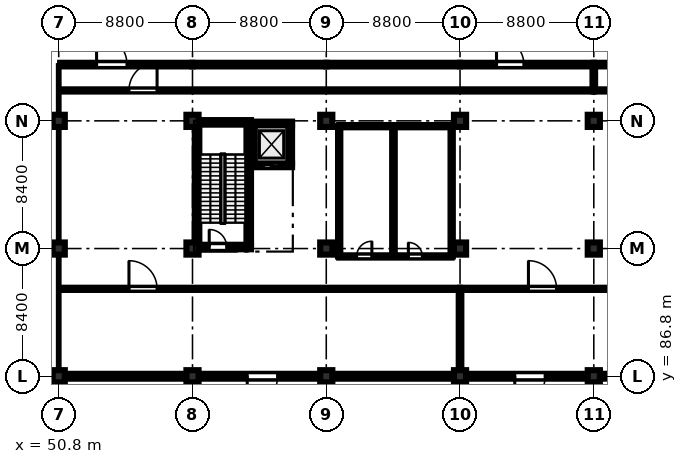
"""IFC4 building model, lengths in metres.
Left out: names, types, materials, properties, quantities, classifications, styles, units other than length and angle.
Written with IfcOpenShell. Run it as: python <this file> out.ifc"""

import sys

from ifc_helpers import new_model, si_unit, direction, frame, frame_2d, origin, origin_2d, place, context, subcontext, project, spatial, rectangle, extrude, element, fill, save


model = new_model("IFC4")
c1 = context("Model", 3, precision=1e-05, world=origin(), true_north=direction((0.0, 1.0)))
c2 = subcontext(c1, "Body", "Model", "MODEL_VIEW")
j1 = project(units=[si_unit("LENGTHUNIT", "METRE"), si_unit("PLANEANGLEUNIT", "RADIAN")], contexts=[c1])
p1 = place(None, origin())
s1 = spatial("IfcSite", under=j1, at=p1, CompositionType="ELEMENT")
p2 = place(p1, origin())
s2 = spatial("IfcBuilding", under=s1, at=p2, CompositionType="ELEMENT")
p3 = place(p2, origin())
s3 = spatial("IfcBuildingStorey", under=s2, at=p3, CompositionType="ELEMENT", Elevation=0.0)
for number, where, z_axis, x_axis in (
    (1, (50.8, 86.8, 0.0), (0.0, 0.0, 1.0), (1.0, 0.0, 0.0)),
    (2, (50.8, 95.2, 0.0), (0.0, 0.0, 1.0), (1.0, 0.0, 0.0)),
    (3, (50.8, 103.6, 0.0), (0.0, 0.0, 1.0), (1.0, 0.0, 0.0)),
    (4, (59.6, 86.8, 0.0), (0.0, 0.0, 1.0), (1.0, 0.0, 0.0)),
    (5, (59.6, 95.2, 0.0), (0.0, 0.0, 1.0), (1.0, 0.0, 0.0)),
    (6, (59.6, 103.6, 0.0), (0.0, 0.0, 1.0), (1.0, 0.0, 0.0)),
    (7, (68.4, 86.8, 0.0), (0.0, 0.0, 1.0), (1.0, 0.0, 0.0)),
    (8, (68.4, 95.2, 0.0), (0.0, 0.0, 1.0), (1.0, 0.0, 0.0)),
    (9, (68.4, 103.6, 0.0), (0.0, 0.0, 1.0), (1.0, 0.0, 0.0)),
    (10, (77.2, 86.8, 0.0), (0.0, 0.0, 1.0), (1.0, 0.0, 0.0)),
    (11, (77.2, 95.2, 0.0), (0.0, 0.0, 1.0), (1.0, 0.0, 0.0)),
    (12, (77.2, 103.6, 0.0), (0.0, 0.0, 1.0), (1.0, 0.0, 0.0)),
    (13, (86.0, 86.8, 0.0), (0.0, 0.0, 1.0), (1.0, 0.0, 0.0)),
    (14, (86.0, 95.2, 0.0), (0.0, 0.0, 1.0), (1.0, 0.0, 0.0)),
    (15, (86.0, 103.6, 0.0), (0.0, 0.0, 1.0), (1.0, 0.0, 0.0)),
):
    element("IfcColumn", number, at=place(p3, frame(where, z_axis=z_axis, x_axis=x_axis)), inside=s3, PredefinedType="COLUMN", context=c2, shape_type="SweptSolid", body=[
        extrude(rectangle(XDim=0.8, YDim=0.8, at=origin_2d()), origin(), (0.0, 0.0, 1.0), 5.18),
    ])
p4 = place(p3, frame((59.75, 95.3, 0.0), z_axis=(0.0, 0.0, 1.0), x_axis=(1.0, 0.0, 0.0)))
e16 = element("IfcWall", 16, at=p4, inside=s3, PredefinedType="SHEAR", context=c2, shape_type="SweptSolid", body=[
    extrude(rectangle(XDim=3.7, YDim=0.3, at=frame_2d((1.85, 0.0))), origin(), (0.0, 0.0, 1.0), 5.18),
])
p5 = place(p4, frame((0.95, 0.0, 0.0)))
e17 = element("IfcOpeningElement", 17, at=p5, cuts=e16, PredefinedType="OPENING", context=c2, shape_type="SweptSolid", body=[
    extrude(rectangle(XDim=1.15, YDim=2.15, at=frame_2d((0.575, 1.075))), frame((0.0, 0.16, 0.0), z_axis=(0.0, -1.0, 0.0), x_axis=(1.0, 0.0, 0.0)), (0.0, 0.0, 1.0), 0.32),
])
p6 = place(p3, frame((59.75, 103.5, 0.0), z_axis=(0.0, 0.0, 1.0), x_axis=(1.0, 0.0, 0.0)))
e18 = element("IfcWall", 18, at=p6, inside=s3, PredefinedType="SHEAR", context=c2, shape_type="SweptSolid", body=[
    extrude(rectangle(XDim=3.7, YDim=0.3, at=frame_2d((1.85, 0.0))), origin(), (0.0, 0.0, 1.0), 5.18),
])
for number, where, z_axis, x_axis in (
    (19, (59.9, 95.45, 0.0), (0.0, 0.0, 1.0), (0.0, 1.0, 0.0)),
    (20, (63.3, 95.45, 0.0), (0.0, 0.0, 1.0), (0.0, 1.0, 0.0)),
):
    element("IfcWall", number, at=place(p3, frame(where, z_axis=z_axis, x_axis=x_axis)), inside=s3, PredefinedType="SHEAR", context=c2, shape_type="SweptSolid", body=[
        extrude(rectangle(XDim=7.9, YDim=0.3, at=frame_2d((3.95, 0.0))), origin(), (0.0, 0.0, 1.0), 5.18),
    ])
p7 = place(p3, frame((63.45, 100.675, 0.0), z_axis=(0.0, 0.0, 1.0), x_axis=(1.0, 0.0, 0.0)))
e21 = element("IfcWall", 21, at=p7, inside=s3, PredefinedType="SHEAR", context=c2, shape_type="SweptSolid", body=[
    extrude(rectangle(XDim=2.7, YDim=0.25, at=frame_2d((1.35, 0.0))), origin(), (0.0, 0.0, 1.0), 5.18),
])
p8 = place(p7, frame((0.83, 0.0, 0.0)))
e22 = element("IfcOpeningElement", 22, at=p8, cuts=e21, PredefinedType="OPENING", context=c2, shape_type="SweptSolid", body=[
    extrude(rectangle(XDim=1.04, YDim=2.15, at=frame_2d((0.52, 1.075))), frame((0.0, 0.135, 0.0), z_axis=(0.0, -1.0, 0.0), x_axis=(1.0, 0.0, 0.0)), (0.0, 0.0, 1.0), 0.27),
])
p9 = place(p3, frame((63.45, 103.425, 0.0), z_axis=(0.0, 0.0, 1.0), x_axis=(1.0, 0.0, 0.0)))
e23 = element("IfcWall", 23, at=p9, inside=s3, PredefinedType="SHEAR", context=c2, shape_type="SweptSolid", body=[
    extrude(rectangle(XDim=2.7, YDim=0.25, at=frame_2d((1.35, 0.0))), origin(), (0.0, 0.0, 1.0), 5.18),
])
for number, where, z_axis, x_axis in (
    (24, (63.575, 100.8, 0.0), (0.0, 0.0, 1.0), (0.0, 1.0, 0.0)),
    (25, (66.025, 100.8, 0.0), (0.0, 0.0, 1.0), (0.0, 1.0, 0.0)),
):
    element("IfcWall", number, at=place(p3, frame(where, z_axis=z_axis, x_axis=x_axis)), inside=s3, PredefinedType="SHEAR", context=c2, shape_type="SweptSolid", body=[
        extrude(rectangle(XDim=2.5, YDim=0.25, at=frame_2d((1.25, 0.0))), origin(), (0.0, 0.0, 1.0), 5.18),
    ])
p10 = place(p3, frame((50.89, 107.3, 0.0), z_axis=(0.0, 0.0, 1.0), x_axis=(1.0, 0.0, 0.0)))
e26 = element("IfcWall", 26, at=p10, inside=s3, PredefinedType="STANDARD", context=c2, shape_type="SweptSolid", body=[
    extrude(rectangle(XDim=8.71, YDim=0.24, at=frame_2d((4.355, 0.0))), origin(), (0.0, 0.0, 1.0), 5.18),
])
p11 = place(p10, frame((2.4, 0.0, 0.0)))
e27 = element("IfcOpeningElement", 27, at=p11, cuts=e26, PredefinedType="OPENING", context=c2, shape_type="SweptSolid", body=[
    extrude(rectangle(XDim=2.0, YDim=2.4, at=frame_2d((1.0, 1.2))), frame((0.0, 0.13, 0.0), z_axis=(0.0, -1.0, 0.0), x_axis=(1.0, 0.0, 0.0)), (0.0, 0.0, 1.0), 0.26),
])
p12 = place(p3, frame((59.2, 86.8, 0.0), z_axis=(0.0, 0.0, 1.0), x_axis=(-1.0, 0.0, 0.0)))
e28 = element("IfcWall", 28, at=p12, inside=s3, PredefinedType="STANDARD", context=c2, shape_type="SweptSolid", body=[
    extrude(rectangle(XDim=8.0, YDim=0.32, at=frame_2d((4.0, 0.0))), origin(), (0.0, 0.0, 1.0), 4.53),
])
p13 = place(p12, frame((2.8, 0.0, 0.95)))
e29 = element("IfcOpeningElement", 29, at=p13, cuts=e28, PredefinedType="OPENING", context=c2, shape_type="SweptSolid", body=[
    extrude(rectangle(XDim=2.0, YDim=2.2, at=frame_2d((1.0, 1.1))), frame((0.0, 0.17, 0.0), z_axis=(0.0, -1.0, 0.0), x_axis=(1.0, 0.0, 0.0)), (0.0, 0.0, 1.0), 0.34),
])
p14 = place(p3, frame((59.6, 107.3, 0.0), z_axis=(0.0, 0.0, 1.0), x_axis=(1.0, 0.0, 0.0)))
e30 = element("IfcWall", 30, at=p14, inside=s3, PredefinedType="STANDARD", context=c2, shape_type="SweptSolid", body=[
    extrude(rectangle(XDim=8.8, YDim=0.24, at=frame_2d((4.4, 0.0))), origin(), (0.0, 0.0, 1.0), 5.18),
])
p15 = place(p14, frame((2.4, 0.0, 0.8)))
e31 = element("IfcOpeningElement", 31, at=p15, cuts=e30, PredefinedType="OPENING", context=c2, shape_type="SweptSolid", body=[
    extrude(rectangle(XDim=3.0, YDim=2.4, at=frame_2d((1.5, 1.2))), frame((0.0, 0.13, 0.0), z_axis=(0.0, -1.0, 0.0), x_axis=(1.0, 0.0, 0.0)), (0.0, 0.0, 1.0), 0.26),
])
p16 = place(p3, frame((68.0, 86.8, 0.0), z_axis=(0.0, 0.0, 1.0), x_axis=(-1.0, 0.0, 0.0)))
e32 = element("IfcWall", 32, at=p16, inside=s3, PredefinedType="STANDARD", context=c2, shape_type="SweptSolid", body=[
    extrude(rectangle(XDim=8.0, YDim=0.32, at=frame_2d((4.0, 0.0))), origin(), (0.0, 0.0, 1.0), 4.53),
])
p17 = place(p16, frame((2.8, 0.0, 0.0)))
e33 = element("IfcOpeningElement", 33, at=p17, cuts=e32, PredefinedType="OPENING", context=c2, shape_type="SweptSolid", body=[
    extrude(rectangle(XDim=2.0, YDim=2.4, at=frame_2d((1.0, 1.2))), frame((0.0, 0.17, 0.0), z_axis=(0.0, -1.0, 0.0), x_axis=(1.0, 0.0, 0.0)), (0.0, 0.0, 1.0), 0.34),
])
p18 = place(p3, frame((68.4, 107.3, 0.0), z_axis=(0.0, 0.0, 1.0), x_axis=(1.0, 0.0, 0.0)))
e34 = element("IfcWall", 34, at=p18, inside=s3, PredefinedType="STANDARD", context=c2, shape_type="SweptSolid", body=[
    extrude(rectangle(XDim=8.8, YDim=0.24, at=frame_2d((4.4, 0.0))), origin(), (0.0, 0.0, 1.0), 5.18),
])
p19 = place(p18, frame((2.4, 0.0, 0.8)))
e35 = element("IfcOpeningElement", 35, at=p19, cuts=e34, PredefinedType="OPENING", context=c2, shape_type="SweptSolid", body=[
    extrude(rectangle(XDim=3.0, YDim=2.4, at=frame_2d((1.5, 1.2))), frame((0.0, 0.13, 0.0), z_axis=(0.0, -1.0, 0.0), x_axis=(1.0, 0.0, 0.0)), (0.0, 0.0, 1.0), 0.26),
])
p20 = place(p3, frame((76.8, 86.8, 0.0), z_axis=(0.0, 0.0, 1.0), x_axis=(-1.0, 0.0, 0.0)))
e36 = element("IfcWall", 36, at=p20, inside=s3, PredefinedType="STANDARD", context=c2, shape_type="SweptSolid", body=[
    extrude(rectangle(XDim=8.0, YDim=0.32, at=frame_2d((4.0, 0.0))), origin(), (0.0, 0.0, 1.0), 4.53),
])
p21 = place(p20, frame((2.8, 0.0, 0.95)))
e37 = element("IfcOpeningElement", 37, at=p21, cuts=e36, PredefinedType="OPENING", context=c2, shape_type="SweptSolid", body=[
    extrude(rectangle(XDim=2.0, YDim=2.2, at=frame_2d((1.0, 1.1))), frame((0.0, 0.17, 0.0), z_axis=(0.0, -1.0, 0.0), x_axis=(1.0, 0.0, 0.0)), (0.0, 0.0, 1.0), 0.34),
])
p22 = place(p3, frame((77.2, 107.3, 0.0), z_axis=(0.0, 0.0, 1.0), x_axis=(1.0, 0.0, 0.0)))
e38 = element("IfcWall", 38, at=p22, inside=s3, PredefinedType="STANDARD", context=c2, shape_type="SweptSolid", body=[
    extrude(rectangle(XDim=8.8, YDim=0.24, at=frame_2d((4.4, 0.0))), origin(), (0.0, 0.0, 1.0), 5.18),
])
p23 = place(p22, frame((2.4, 0.0, 0.0)))
e39 = element("IfcOpeningElement", 39, at=p23, cuts=e38, PredefinedType="OPENING", context=c2, shape_type="SweptSolid", body=[
    extrude(rectangle(XDim=1.8, YDim=2.3, at=frame_2d((0.9, 1.15))), frame((0.0, 0.13, 0.0), z_axis=(0.0, -1.0, 0.0), x_axis=(1.0, 0.0, 0.0)), (0.0, 0.0, 1.0), 0.26),
])
p24 = place(p3, frame((85.6, 86.8, 0.0), z_axis=(0.0, 0.0, 1.0), x_axis=(-1.0, 0.0, 0.0)))
e40 = element("IfcWall", 40, at=p24, inside=s3, PredefinedType="STANDARD", context=c2, shape_type="SweptSolid", body=[
    extrude(rectangle(XDim=8.0, YDim=0.32, at=frame_2d((4.0, 0.0))), origin(), (0.0, 0.0, 1.0), 4.53),
])
p25 = place(p24, frame((2.8, 0.0, 0.0)))
e41 = element("IfcOpeningElement", 41, at=p25, cuts=e40, PredefinedType="OPENING", context=c2, shape_type="SweptSolid", body=[
    extrude(rectangle(XDim=2.0, YDim=2.4, at=frame_2d((1.0, 1.2))), frame((0.0, 0.17, 0.0), z_axis=(0.0, -1.0, 0.0), x_axis=(1.0, 0.0, 0.0)), (0.0, 0.0, 1.0), 0.34),
])
p26 = place(p3, frame((86.0, 107.3, 0.0), z_axis=(0.0, 0.0, 1.0), x_axis=(1.0, 0.0, 0.0)))
e42 = element("IfcWall", 42, at=p26, inside=s3, PredefinedType="STANDARD", context=c2, shape_type="SweptSolid", body=[
    extrude(rectangle(XDim=8.8, YDim=0.24, at=frame_2d((4.4, 0.0))), origin(), (0.0, 0.0, 1.0), 5.18),
])
p27 = place(p26, frame((2.4, 0.0, 0.8)))
e43 = element("IfcOpeningElement", 43, at=p27, cuts=e42, PredefinedType="OPENING", context=c2, shape_type="SweptSolid", body=[
    extrude(rectangle(XDim=3.0, YDim=2.4, at=frame_2d((1.5, 1.2))), frame((0.0, 0.13, 0.0), z_axis=(0.0, -1.0, 0.0), x_axis=(1.0, 0.0, 0.0)), (0.0, 0.0, 1.0), 0.26),
])
p28 = place(p3, frame((94.4, 86.8, 0.0), z_axis=(0.0, 0.0, 1.0), x_axis=(-1.0, 0.0, 0.0)))
e44 = element("IfcWall", 44, at=p28, inside=s3, PredefinedType="STANDARD", context=c2, shape_type="SweptSolid", body=[
    extrude(rectangle(XDim=8.0, YDim=0.32, at=frame_2d((4.0, 0.0))), origin(), (0.0, 0.0, 1.0), 4.53),
])
p29 = place(p28, frame((2.8, 0.0, 0.95)))
e45 = element("IfcOpeningElement", 45, at=p29, cuts=e44, PredefinedType="OPENING", context=c2, shape_type="SweptSolid", body=[
    extrude(rectangle(XDim=2.0, YDim=2.2, at=frame_2d((1.0, 1.1))), frame((0.0, 0.17, 0.0), z_axis=(0.0, -1.0, 0.0), x_axis=(1.0, 0.0, 0.0)), (0.0, 0.0, 1.0), 0.34),
])
p30 = place(p3, frame((69.25, 94.68, 0.0), z_axis=(0.0, 0.0, 1.0), x_axis=(1.0, 0.0, 0.0)))
e46 = element("IfcWall", 46, at=p30, inside=s3, PredefinedType="PARTITIONING", context=c2, shape_type="SweptSolid", body=[
    extrude(rectangle(XDim=7.4, YDim=0.15, at=frame_2d((3.7, 0.0))), origin(), (0.0, 0.0, 1.0), 5.18),
])
p31 = place(p30, frame((1.15, 0.0, 0.0)))
e47 = element("IfcOpeningElement", 47, at=p31, cuts=e46, PredefinedType="OPENING", context=c2, shape_type="SweptSolid", body=[
    extrude(rectangle(XDim=1.0, YDim=2.12, at=frame_2d((0.5, 1.06))), frame((0.0, 0.085, 0.0), z_axis=(0.0, -1.0, 0.0), x_axis=(1.0, 0.0, 0.0)), (0.0, 0.0, 1.0), 0.17),
])
p32 = place(p30, frame((4.55, 0.0, 0.0)))
e48 = element("IfcOpeningElement", 48, at=p32, cuts=e46, PredefinedType="OPENING", context=c2, shape_type="SweptSolid", body=[
    extrude(rectangle(XDim=0.92, YDim=2.1, at=frame_2d((0.46, 1.05))), frame((0.0, 0.085, 0.0), z_axis=(0.0, -1.0, 0.0), x_axis=(1.0, 0.0, 0.0)), (0.0, 0.0, 1.0), 0.17),
])
p33 = place(p3, frame((69.25, 94.68, 0.0), z_axis=(0.0, 0.0, 1.0), x_axis=(0.0, 1.0, 0.0)))
e49 = element("IfcWall", 49, at=p33, inside=s3, PredefinedType="PARTITIONING", context=c2, shape_type="SweptSolid", body=[
    extrude(rectangle(XDim=8.57, YDim=0.15, at=frame_2d((4.285, 0.0))), origin(), (0.0, 0.0, 1.0), 5.18),
])
p34 = place(p3, frame((72.82, 94.68, 0.0), z_axis=(0.0, 0.0, 1.0), x_axis=(0.0, 1.0, 0.0)))
e50 = element("IfcWall", 50, at=p34, inside=s3, PredefinedType="PARTITIONING", context=c2, shape_type="SweptSolid", body=[
    extrude(rectangle(XDim=8.57, YDim=0.172, at=frame_2d((4.285, 0.0))), origin(), (0.0, 0.0, 1.0), 4.73),
])
p35 = place(p3, frame((69.25, 103.25, 0.0), z_axis=(0.0, 0.0, 1.0), x_axis=(1.0, 0.0, 0.0)))
e51 = element("IfcWall", 51, at=p35, inside=s3, PredefinedType="PARTITIONING", context=c2, shape_type="SweptSolid", body=[
    extrude(rectangle(XDim=7.4, YDim=0.15, at=frame_2d((3.7, 0.0))), origin(), (0.0, 0.0, 1.0), 5.18),
])
p36 = place(p3, frame((76.65, 94.68, 0.0), z_axis=(0.0, 0.0, 1.0), x_axis=(0.0, 1.0, 0.0)))
e52 = element("IfcWall", 52, at=p36, inside=s3, PredefinedType="PARTITIONING", context=c2, shape_type="SweptSolid", body=[
    extrude(rectangle(XDim=8.57, YDim=0.15, at=frame_2d((4.285, 0.0))), origin(), (0.0, 0.0, 1.0), 5.18),
])
p37 = place(p3, frame((50.92, 92.55, 0.0), z_axis=(0.0, 0.0, 1.0), x_axis=(1.0, 0.0, 0.0)))
e53 = element("IfcWall", 53, at=p37, inside=s3, PredefinedType="PARTITIONING", context=c2, shape_type="SweptSolid", body=[
    extrude(rectangle(XDim=26.28, YDim=0.145, at=frame_2d((13.14, 0.0))), origin(), (0.0, 0.0, 1.0), 5.18),
])
p38 = place(p37, frame((4.5, 0.0, 0.0)))
e54 = element("IfcOpeningElement", 54, at=p38, cuts=e53, PredefinedType="OPENING", context=c2, shape_type="SweptSolid", body=[
    extrude(rectangle(XDim=1.85, YDim=2.25, at=frame_2d((0.925, 1.125))), frame((0.0, 0.083, 0.0), z_axis=(0.0, -1.0, 0.0), x_axis=(1.0, 0.0, 0.0)), (0.0, 0.0, 1.0), 0.165),
])
p39 = place(p3, frame((77.2, 92.55, 0.0), z_axis=(0.0, 0.0, 1.0), x_axis=(1.0, 0.0, 0.0)))
e55 = element("IfcWall", 55, at=p39, inside=s3, PredefinedType="PARTITIONING", context=c2, shape_type="SweptSolid", body=[
    extrude(rectangle(XDim=22.0, YDim=0.145, at=frame_2d((11.0, 0.0))), origin(), (0.0, 0.0, 1.0), 5.18),
])
p40 = place(p39, frame((4.5, 0.0, 0.0)))
e56 = element("IfcOpeningElement", 56, at=p40, cuts=e55, PredefinedType="OPENING", context=c2, shape_type="SweptSolid", body=[
    extrude(rectangle(XDim=1.85, YDim=2.25, at=frame_2d((0.925, 1.125))), frame((0.0, 0.083, 0.0), z_axis=(0.0, -1.0, 0.0), x_axis=(1.0, 0.0, 0.0)), (0.0, 0.0, 1.0), 0.165),
])
p41 = place(p3, frame((77.2, 86.95, 0.0), z_axis=(0.0, 0.0, 1.0), x_axis=(0.0, 1.0, 0.0)))
e57 = element("IfcWall", 57, at=p41, inside=s3, PredefinedType="PARTITIONING", context=c2, shape_type="SweptSolid", body=[
    extrude(rectangle(XDim=5.6, YDim=0.172, at=frame_2d((2.8, 0.0))), origin(), (0.0, 0.0, 1.0), 4.53),
])
p42 = place(p3, frame((50.92, 105.6, 0.0), z_axis=(0.0, 0.0, 1.0), x_axis=(1.0, 0.0, 0.0)))
e58 = element("IfcWall", 58, at=p42, inside=s3, PredefinedType="PARTITIONING", context=c2, shape_type="SweptSolid", body=[
    extrude(rectangle(XDim=35.08, YDim=0.145, at=frame_2d((17.54, 0.0))), origin(), (0.0, 0.0, 1.0), 5.18),
])
p43 = place(p42, frame((4.5, 0.0, 0.0)))
e59 = element("IfcOpeningElement", 59, at=p43, cuts=e58, PredefinedType="OPENING", context=c2, shape_type="SweptSolid", body=[
    extrude(rectangle(XDim=1.85, YDim=2.25, at=frame_2d((0.925, 1.125))), frame((0.0, 0.083, 0.0), z_axis=(0.0, -1.0, 0.0), x_axis=(1.0, 0.0, 0.0)), (0.0, 0.0, 1.0), 0.165),
])
p44 = place(p3, frame((86.0, 105.6, 0.0), z_axis=(0.0, 0.0, 1.0), x_axis=(1.0, 0.0, 0.0)))
e60 = element("IfcWall", 60, at=p44, inside=s3, PredefinedType="PARTITIONING", context=c2, shape_type="SweptSolid", body=[
    extrude(rectangle(XDim=35.02, YDim=0.145, at=frame_2d((17.51, 0.0))), origin(), (0.0, 0.0, 1.0), 5.18),
])
p45 = place(p44, frame((4.5, 0.0, 0.0)))
e61 = element("IfcOpeningElement", 61, at=p45, cuts=e60, PredefinedType="OPENING", context=c2, shape_type="SweptSolid", body=[
    extrude(rectangle(XDim=1.85, YDim=2.25, at=frame_2d((0.925, 1.125))), frame((0.0, 0.083, 0.0), z_axis=(0.0, -1.0, 0.0), x_axis=(1.0, 0.0, 0.0)), (0.0, 0.0, 1.0), 0.165),
])
p46 = place(p3, frame((86.0, 105.6, 0.0), z_axis=(0.0, 0.0, 1.0), x_axis=(0.0, 1.0, 0.0)))
e62 = element("IfcWall", 62, at=p46, inside=s3, PredefinedType="PARTITIONING", context=c2, shape_type="SweptSolid", body=[
    extrude(rectangle(XDim=1.58, YDim=0.172, at=frame_2d((0.79, 0.0))), origin(), (0.0, 0.0, 1.0), 4.53),
])
p47 = place(p11, origin())
e63 = element("IfcDoor", 63, at=p47, inside=s3, OperationType="SINGLE_SWING_LEFT", PredefinedType="DOOR", context=c2, shape_type="SweptSolid", body=[
    extrude(rectangle(XDim=2.0, YDim=2.4, at=frame_2d((1.0, 1.2))), frame((0.0, 0.025, 0.0), z_axis=(0.0, -1.0, 0.0), x_axis=(1.0, 0.0, 0.0)), (0.0, 0.0, 1.0), 0.05),
])
fill(e27, e63)
p48 = place(p13, origin())
e64 = element("IfcWindow", 64, at=p48, inside=s3, PartitioningType="DOUBLE_PANEL_VERTICAL", PredefinedType="WINDOW", context=c2, shape_type="SweptSolid", body=[
    extrude(rectangle(XDim=2.0, YDim=2.2, at=frame_2d((1.0, 1.1))), frame((0.0, 0.03, 0.0), z_axis=(0.0, -1.0, 0.0), x_axis=(1.0, 0.0, 0.0)), (0.0, 0.0, 1.0), 0.06),
])
fill(e29, e64)
p49 = place(p15, origin())
e65 = element("IfcWindow", 65, at=p49, inside=s3, PartitioningType="TRIPLE_PANEL_VERTICAL", PredefinedType="WINDOW", context=c2, shape_type="SweptSolid", body=[
    extrude(rectangle(XDim=3.0, YDim=2.4, at=frame_2d((1.5, 1.2))), frame((0.0, 0.03, 0.0), z_axis=(0.0, -1.0, 0.0), x_axis=(1.0, 0.0, 0.0)), (0.0, 0.0, 1.0), 0.06),
])
fill(e31, e65)
p50 = place(p17, origin())
e66 = element("IfcDoor", 66, at=p50, inside=s3, OperationType="SINGLE_SWING_RIGHT", PredefinedType="DOOR", context=c2, shape_type="SweptSolid", body=[
    extrude(rectangle(XDim=2.0, YDim=2.4, at=frame_2d((1.0, 1.2))), frame((0.0, 0.025, 0.0), z_axis=(0.0, -1.0, 0.0), x_axis=(1.0, 0.0, 0.0)), (0.0, 0.0, 1.0), 0.05),
])
fill(e33, e66)
p51 = place(p19, origin())
e67 = element("IfcWindow", 67, at=p51, inside=s3, PartitioningType="TRIPLE_PANEL_VERTICAL", PredefinedType="WINDOW", context=c2, shape_type="SweptSolid", body=[
    extrude(rectangle(XDim=3.0, YDim=2.4, at=frame_2d((1.5, 1.2))), frame((0.0, 0.03, 0.0), z_axis=(0.0, -1.0, 0.0), x_axis=(1.0, 0.0, 0.0)), (0.0, 0.0, 1.0), 0.06),
])
fill(e35, e67)
p52 = place(p21, origin())
e68 = element("IfcWindow", 68, at=p52, inside=s3, PartitioningType="DOUBLE_PANEL_VERTICAL", PredefinedType="WINDOW", context=c2, shape_type="SweptSolid", body=[
    extrude(rectangle(XDim=2.0, YDim=2.2, at=frame_2d((1.0, 1.1))), frame((0.0, 0.03, 0.0), z_axis=(0.0, -1.0, 0.0), x_axis=(1.0, 0.0, 0.0)), (0.0, 0.0, 1.0), 0.06),
])
fill(e37, e68)
p53 = place(p23, origin())
e69 = element("IfcDoor", 69, at=p53, inside=s3, OperationType="SINGLE_SWING_LEFT", PredefinedType="DOOR", context=c2, shape_type="SweptSolid", body=[
    extrude(rectangle(XDim=1.8, YDim=2.3, at=frame_2d((0.9, 1.15))), frame((0.0, 0.025, 0.0), z_axis=(0.0, -1.0, 0.0), x_axis=(1.0, 0.0, 0.0)), (0.0, 0.0, 1.0), 0.05),
])
fill(e39, e69)
p54 = place(p25, origin())
e70 = element("IfcDoor", 70, at=p54, inside=s3, OperationType="SINGLE_SWING_RIGHT", PredefinedType="DOOR", context=c2, shape_type="SweptSolid", body=[
    extrude(rectangle(XDim=2.0, YDim=2.4, at=frame_2d((1.0, 1.2))), frame((0.0, 0.025, 0.0), z_axis=(0.0, -1.0, 0.0), x_axis=(1.0, 0.0, 0.0)), (0.0, 0.0, 1.0), 0.05),
])
fill(e41, e70)
p55 = place(p31, origin())
e71 = element("IfcDoor", 71, at=p55, inside=s3, OperationType="SINGLE_SWING_RIGHT", PredefinedType="DOOR", context=c2, shape_type="SweptSolid", body=[
    extrude(rectangle(XDim=1.0, YDim=2.12, at=frame_2d((0.5, 1.06))), frame((0.0, 0.025, 0.0), z_axis=(0.0, -1.0, 0.0), x_axis=(1.0, 0.0, 0.0)), (0.0, 0.0, 1.0), 0.05),
])
fill(e47, e71)
p56 = place(p32, origin())
e72 = element("IfcDoor", 72, at=p56, inside=s3, OperationType="SINGLE_SWING_LEFT", PredefinedType="DOOR", context=c2, shape_type="SweptSolid", body=[
    extrude(rectangle(XDim=0.92, YDim=2.1, at=frame_2d((0.46, 1.05))), frame((0.0, 0.025, 0.0), z_axis=(0.0, -1.0, 0.0), x_axis=(1.0, 0.0, 0.0)), (0.0, 0.0, 1.0), 0.05),
])
fill(e48, e72)
p57 = place(p38, origin())
e73 = element("IfcDoor", 73, at=p57, inside=s3, OperationType="SINGLE_SWING_LEFT", PredefinedType="DOOR", context=c2, shape_type="SweptSolid", body=[
    extrude(rectangle(XDim=1.85, YDim=2.25, at=frame_2d((0.925, 1.125))), frame((0.0, 0.025, 0.0), z_axis=(0.0, -1.0, 0.0), x_axis=(1.0, 0.0, 0.0)), (0.0, 0.0, 1.0), 0.05),
])
fill(e54, e73)
p58 = place(p40, origin())
e74 = element("IfcDoor", 74, at=p58, inside=s3, OperationType="SINGLE_SWING_LEFT", PredefinedType="DOOR", context=c2, shape_type="SweptSolid", body=[
    extrude(rectangle(XDim=1.85, YDim=2.25, at=frame_2d((0.925, 1.125))), frame((0.0, 0.025, 0.0), z_axis=(0.0, -1.0, 0.0), x_axis=(1.0, 0.0, 0.0)), (0.0, 0.0, 1.0), 0.05),
])
fill(e56, e74)
p59 = place(p43, origin())
e75 = element("IfcDoor", 75, at=p59, inside=s3, OperationType="SINGLE_SWING_RIGHT", PredefinedType="DOOR", context=c2, shape_type="SweptSolid", body=[
    extrude(rectangle(XDim=1.85, YDim=2.25, at=frame_2d((0.925, 1.125))), frame((0.0, 0.025, 0.0), z_axis=(0.0, -1.0, 0.0), x_axis=(1.0, 0.0, 0.0)), (0.0, 0.0, 1.0), 0.05),
])
fill(e59, e75)
p60 = place(p5, origin())
e76 = element("IfcDoor", 76, at=p60, inside=s3, OperationType="SINGLE_SWING_LEFT", PredefinedType="DOOR", context=c2, shape_type="SweptSolid", body=[
    extrude(rectangle(XDim=1.15, YDim=2.15, at=frame_2d((0.575, 1.075))), frame((0.0, 0.025, 0.0), z_axis=(0.0, -1.0, 0.0), x_axis=(1.0, 0.0, 0.0)), (0.0, 0.0, 1.0), 0.05),
])
fill(e17, e76)
p61 = place(p8, origin())
e77 = element("IfcDoor", 77, at=p61, inside=s3, OperationType="SLIDING_TO_LEFT", PredefinedType="DOOR", context=c2, shape_type="SweptSolid", body=[
    extrude(rectangle(XDim=1.04, YDim=2.15, at=frame_2d((0.52, 1.075))), frame((0.0, 0.025, 0.0), z_axis=(0.0, -1.0, 0.0), x_axis=(1.0, 0.0, 0.0)), (0.0, 0.0, 1.0), 0.05),
])
fill(e22, e77)
save(model, sys.argv[1])
